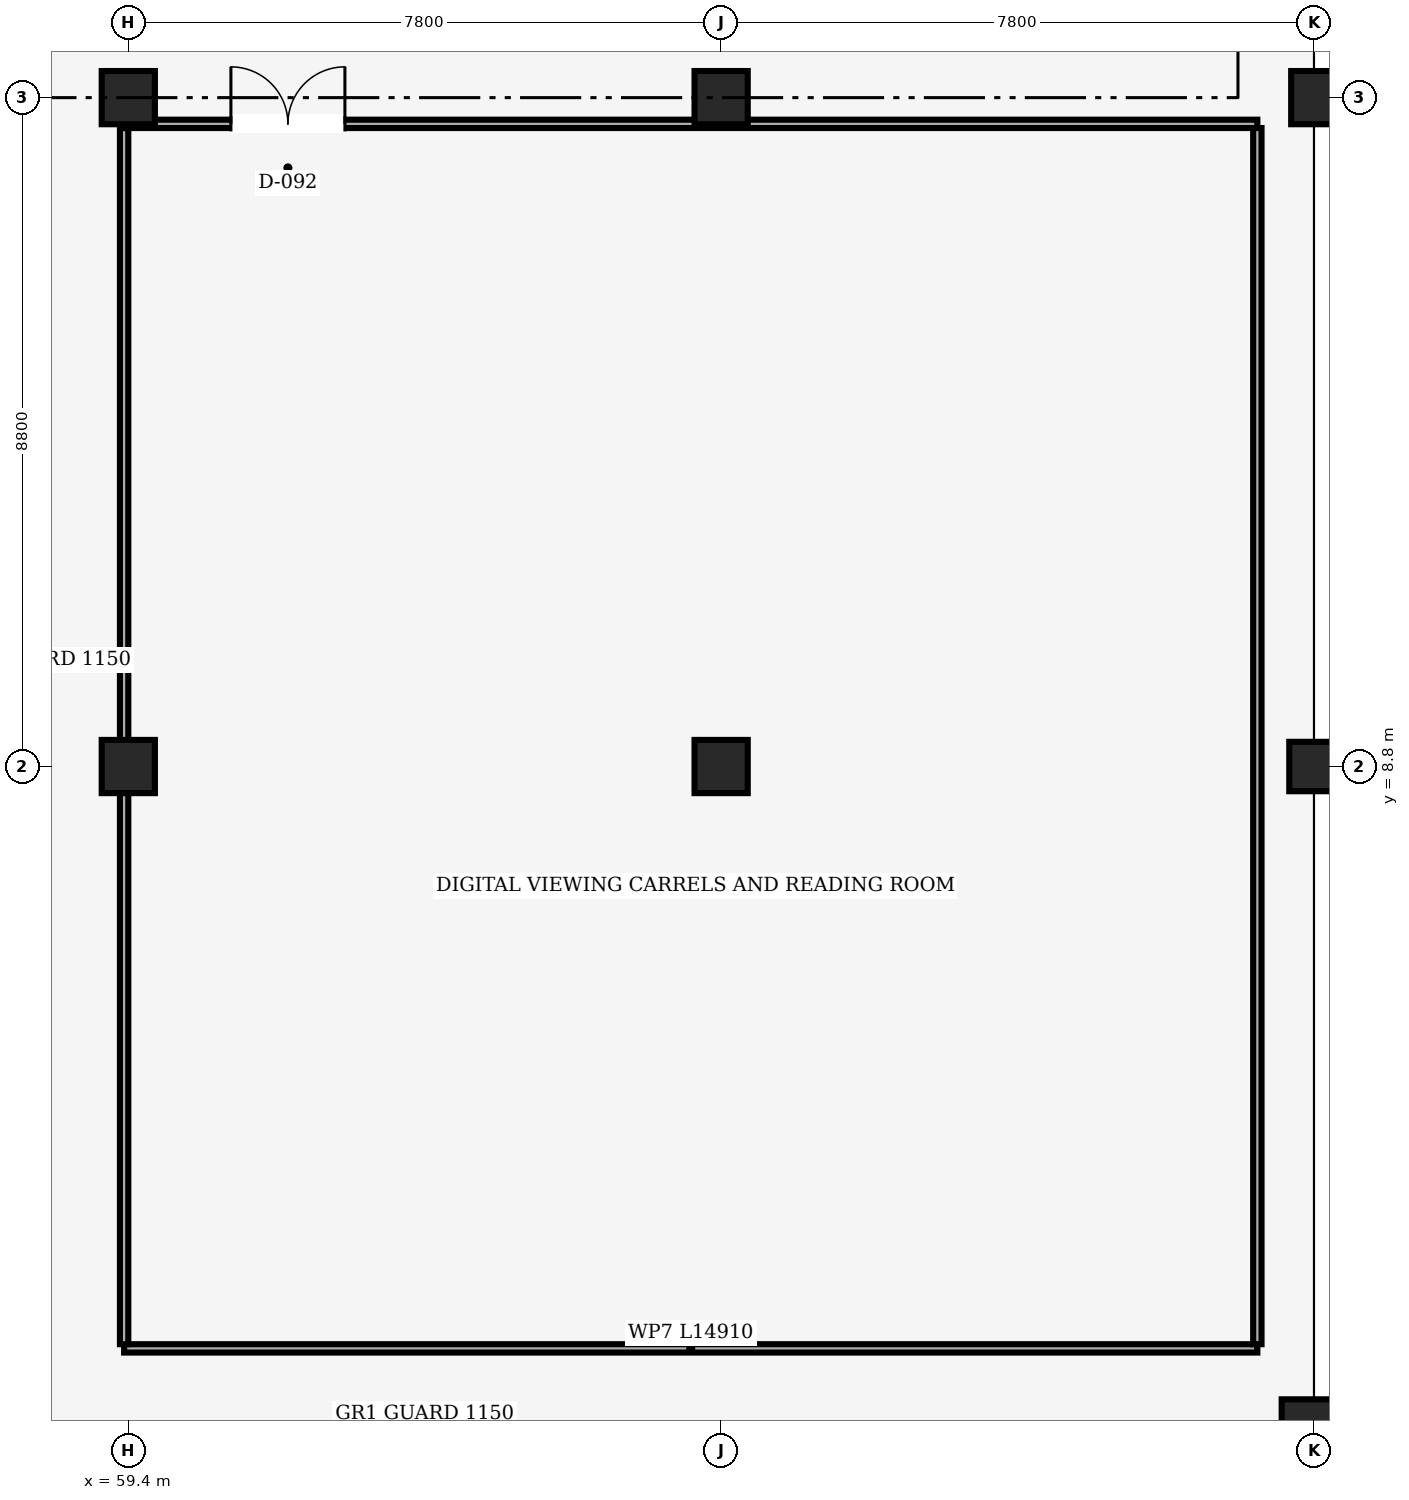
"""IFC4 building model, lengths in metres.
Left out: names, types, materials, properties, quantities, classifications, styles, units other than length and angle.
Written with IfcOpenShell. Run it as: python <this file> out.ifc"""

import sys

from ifc_helpers import new_model, si_unit, direction, frame, frame_2d, origin, origin_2d, place, context, subcontext, project, spatial, rectangle, circle, extrude, element, fill, save


model = new_model("IFC4")
c1 = context("Model", 3, precision=1e-05, world=origin(), true_north=direction((0.0, 1.0)))
c2 = subcontext(c1, "Body", "Model", "MODEL_VIEW")
j1 = project(units=[si_unit("LENGTHUNIT", "METRE"), si_unit("PLANEANGLEUNIT", "RADIAN")], contexts=[c1])
p1 = place(None, origin())
s1 = spatial("IfcSite", under=j1, at=p1, CompositionType="ELEMENT")
p2 = place(p1, origin())
s2 = spatial("IfcBuilding", under=s1, at=p2, CompositionType="ELEMENT")
p3 = place(p2, frame((0.0, 0.0, 12.0)))
s3 = spatial("IfcBuildingStorey", under=s2, at=p3, CompositionType="ELEMENT", Elevation=12.0)
for number, where, z_axis, x_axis in (
    (1, (59.4, 8.8, 0.0), (0.0, 0.0, 1.0), (1.0, 0.0, 0.0)),
    (2, (59.4, 17.6, 0.0), (0.0, 0.0, 1.0), (1.0, 0.0, 0.0)),
    (3, (67.2, 8.8, 0.0), (0.0, 0.0, 1.0), (1.0, 0.0, 0.0)),
    (4, (67.2, 17.6, 0.0), (0.0, 0.0, 1.0), (1.0, 0.0, 0.0)),
):
    element("IfcColumn", number, at=place(p3, frame(where, z_axis=z_axis, x_axis=x_axis)), inside=s3, PredefinedType="COLUMN", context=c2, shape_type="SweptSolid", body=[
        extrude(circle(Radius=0.35, at=origin_2d()), origin(), (0.0, 0.0, 1.0), 3.35),
    ])
p4 = place(p3, frame((75.0, 0.0, 0.0), z_axis=(0.0, 0.0, 1.0), x_axis=(1.0, 0.0, 0.0)))
e5 = element("IfcColumn", 5, at=p4, inside=s3, PredefinedType="COLUMN", context=c2, shape_type="SweptSolid", body=[
    extrude(rectangle(XDim=0.85, YDim=0.95, at=origin_2d()), origin(), (0.0, 0.0, 1.0), 3.35),
])
p5 = place(p3, frame((75.0, 8.8, 0.0), z_axis=(0.0, 0.0, 1.0), x_axis=(1.0, 0.0, 0.0)))
e6 = element("IfcColumn", 6, at=p5, inside=s3, PredefinedType="COLUMN", context=c2, shape_type="SweptSolid", body=[
    extrude(rectangle(XDim=0.65, YDim=0.65, at=origin_2d()), origin(), (0.0, 0.0, 1.0), 3.35),
])
p6 = place(p3, frame((75.0, 17.6, 0.0), z_axis=(0.0, 0.0, 1.0), x_axis=(1.0, 0.0, 0.0)))
e7 = element("IfcColumn", 7, at=p6, inside=s3, PredefinedType="COLUMN", context=c2, shape_type="SweptSolid", body=[
    extrude(rectangle(XDim=0.6, YDim=0.7, at=origin_2d()), origin(), (0.0, 0.0, 1.0), 3.35),
])
p7 = place(p3, frame((74.255, 1.145, 0.0), z_axis=(0.0, 0.0, 1.0), x_axis=(-1.0, 0.0, 0.0)))
e8 = element("IfcWall", 8, at=p7, inside=s3, PredefinedType="PARTITIONING", context=c2, shape_type="SweptSolid", body=[
    extrude(rectangle(XDim=14.91, YDim=0.11, at=frame_2d((7.455, 0.0))), origin(), (0.0, 0.0, 1.0), 3.33),
])
p8 = place(p3, frame((59.345, 1.2, 0.0), z_axis=(0.0, 0.0, 1.0), x_axis=(0.0, 1.0, 0.0)))
e9 = element("IfcWall", 9, at=p8, inside=s3, PredefinedType="PARTITIONING", context=c2, shape_type="SweptSolid", body=[
    extrude(rectangle(XDim=16.0, YDim=0.11, at=frame_2d((8.0, 0.0))), origin(), (0.0, 0.0, 1.0), 2.68),
])
p9 = place(p3, frame((59.345, 17.255, 0.0), z_axis=(0.0, 0.0, 1.0), x_axis=(1.0, 0.0, 0.0)))
e10 = element("IfcWall", 10, at=p9, inside=s3, PredefinedType="PARTITIONING", context=c2, shape_type="SweptSolid", body=[
    extrude(rectangle(XDim=14.91, YDim=0.11, at=frame_2d((7.455, 0.0))), origin(), (0.0, 0.0, 1.0), 2.63),
])
p10 = place(p9, frame((1.405, 0.0, 0.0)))
e11 = element("IfcOpeningElement", 11, at=p10, cuts=e10, PredefinedType="OPENING", context=c2, shape_type="SweptSolid", body=[
    extrude(rectangle(XDim=1.5, YDim=2.2, at=frame_2d((0.75, 1.1))), frame((0.0, 0.055, 0.0), z_axis=(0.0, -1.0, 0.0), x_axis=(1.0, 0.0, 0.0)), (0.0, 0.0, 1.0), 0.11),
])
p11 = place(p3, frame((74.255, 17.2, 0.0), z_axis=(0.0, 0.0, 1.0), x_axis=(0.0, -1.0, 0.0)))
e12 = element("IfcWall", 12, at=p11, inside=s3, PredefinedType="PARTITIONING", context=c2, shape_type="SweptSolid", body=[
    extrude(rectangle(XDim=16.0, YDim=0.11, at=frame_2d((8.0, 0.0))), origin(), (0.0, 0.0, 1.0), 3.33),
])
p12 = place(p10, origin())
e13 = element("IfcDoor", 13, at=p12, inside=s3, OperationType="DOUBLE_DOOR_SINGLE_SWING", PredefinedType="DOOR", context=c2, shape_type="SweptSolid", body=[
    extrude(rectangle(XDim=1.5, YDim=2.2, at=frame_2d((0.75, 1.1))), frame((0.0, 0.025, 0.0), z_axis=(0.0, -1.0, 0.0), x_axis=(1.0, 0.0, 0.0)), (0.0, 0.0, 1.0), 0.05),
])
fill(e11, e13)
save(model, sys.argv[1])
